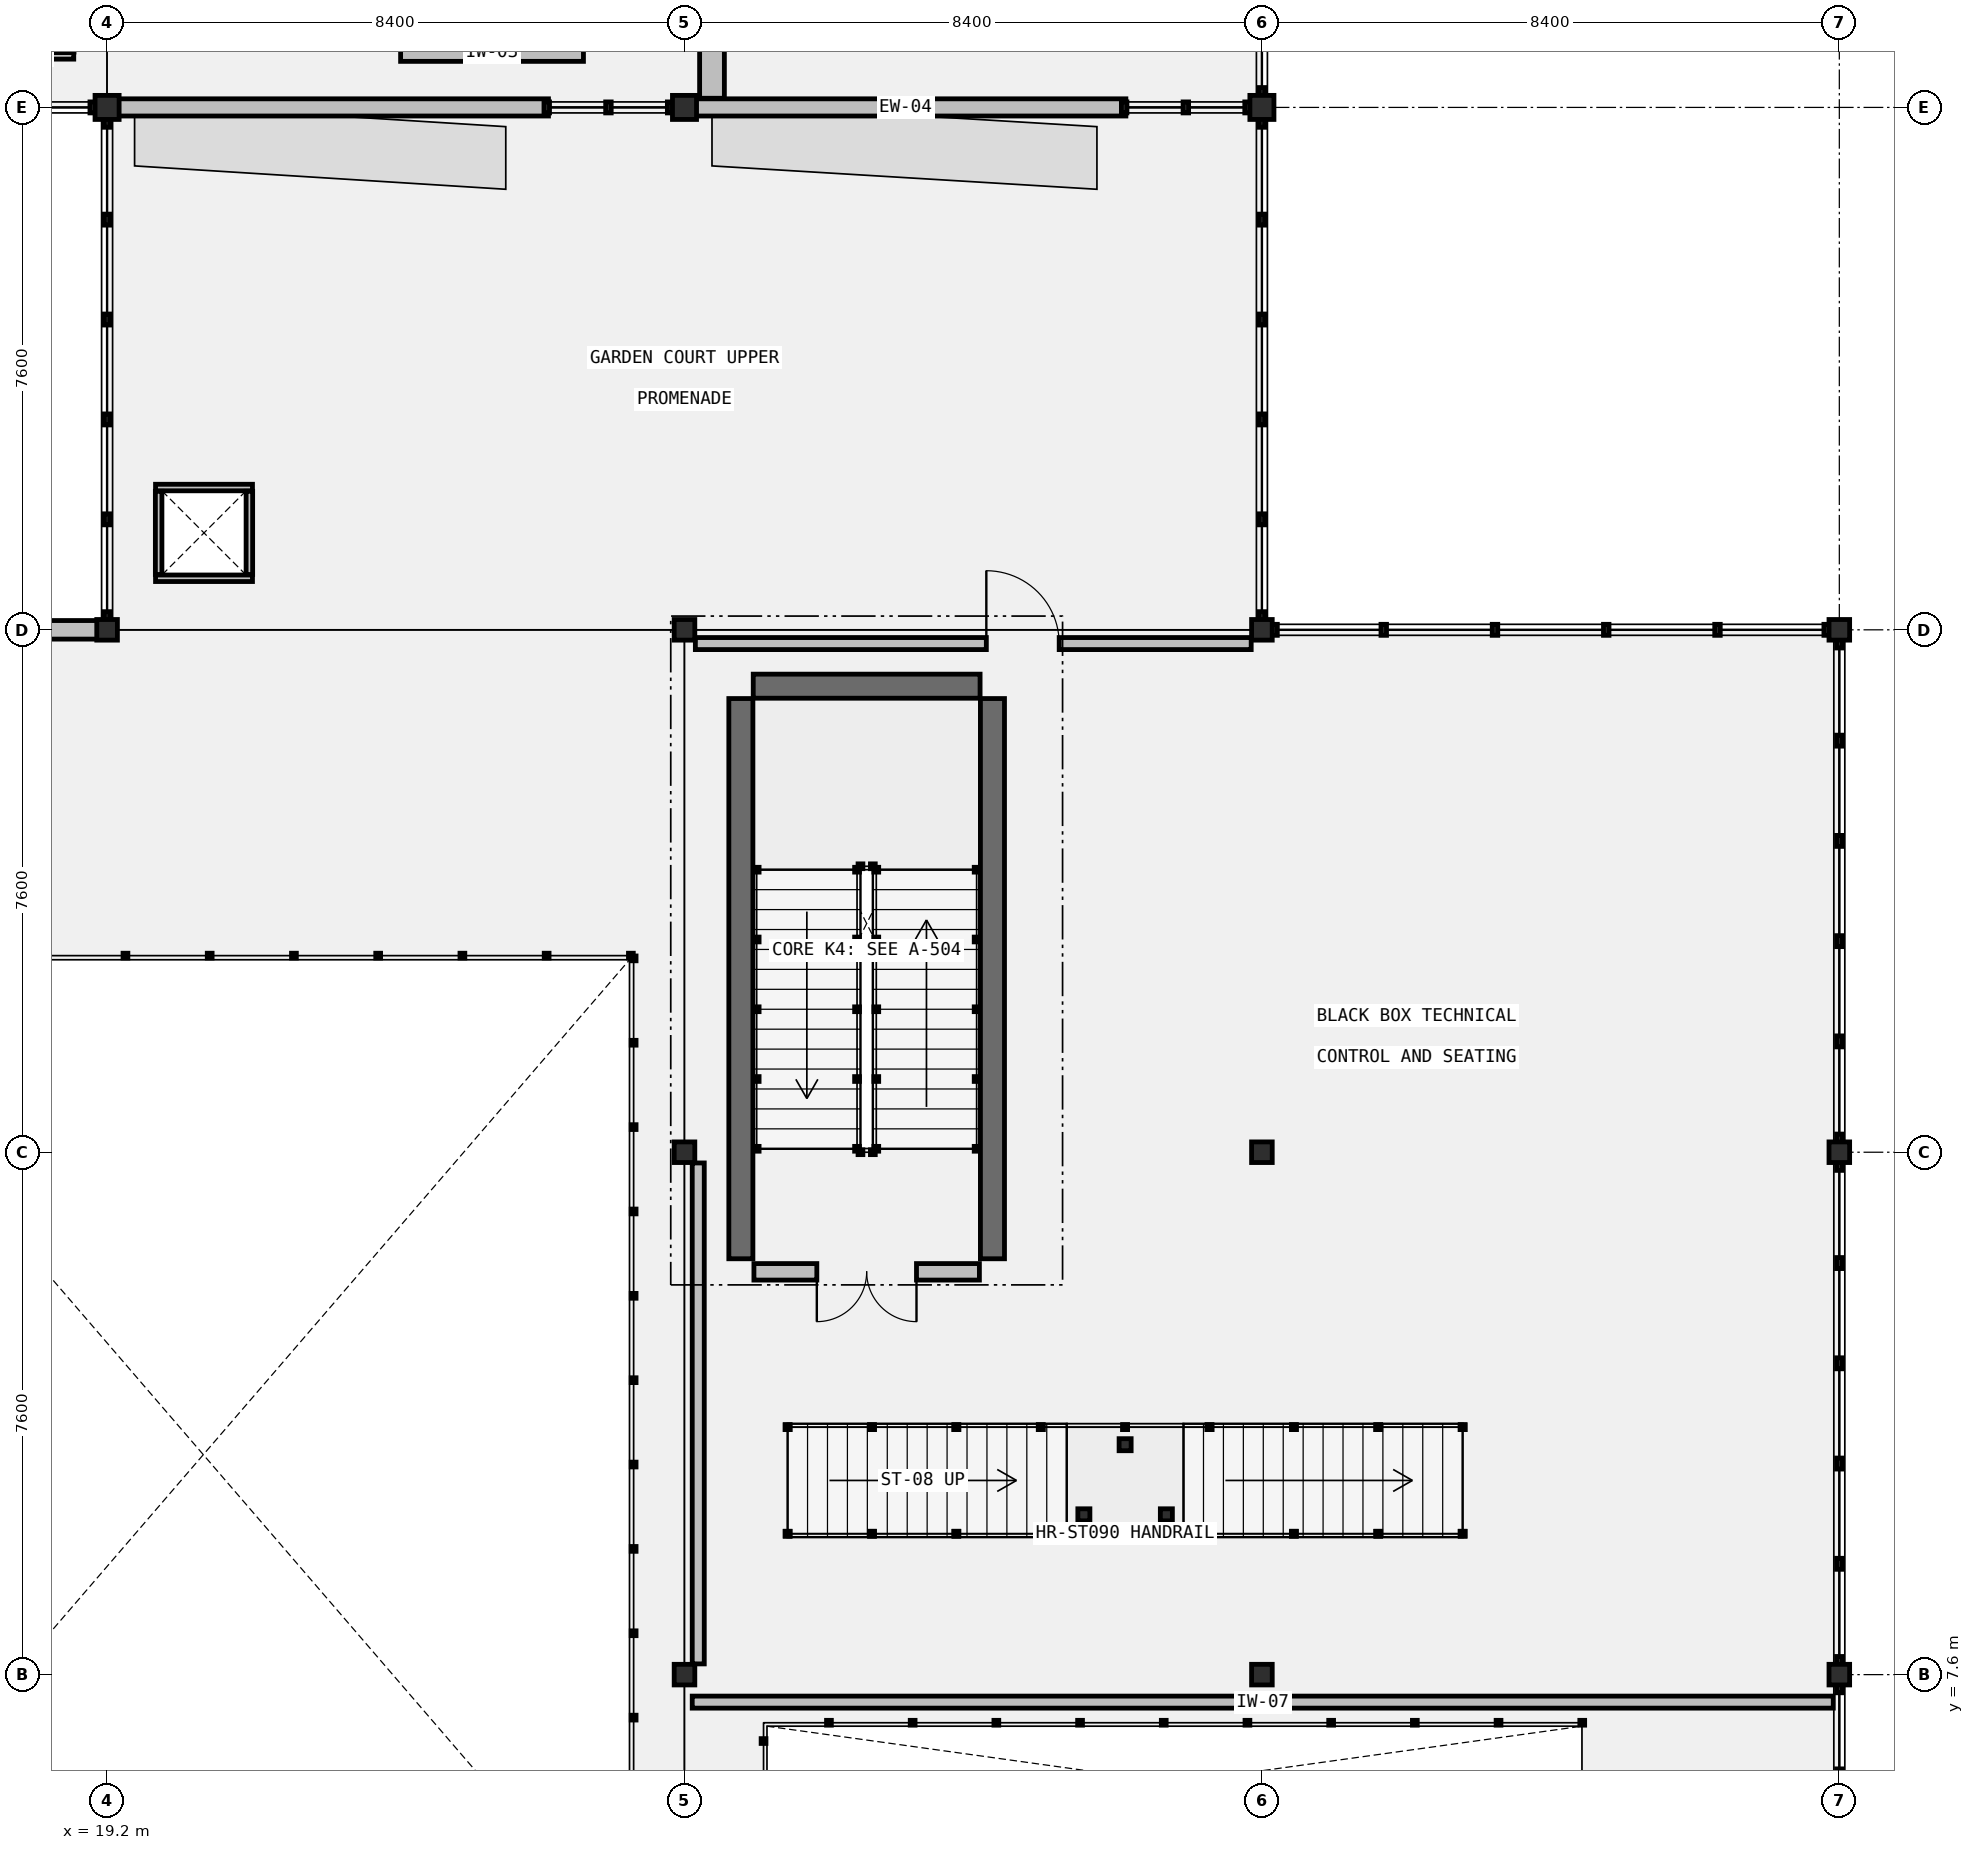
"""IFC4 building model, lengths in metres.
Left out: names, types, materials, properties, quantities, classifications, styles, units other than length and angle.
Written with IfcOpenShell. Run it as: python <this file> out.ifc"""

import sys

from ifc_helpers import new_model, si_unit, direction, frame, frame_2d, origin, origin_2d, place, context, subcontext, project, spatial, rectangle, i_section, extrude, element, fill, save


model = new_model("IFC4")
c1 = context("Model", 3, precision=1e-05, world=origin(), true_north=direction((0.0, 1.0)))
c2 = subcontext(c1, "Body", "Model", "MODEL_VIEW")
j1 = project(units=[si_unit("LENGTHUNIT", "METRE"), si_unit("PLANEANGLEUNIT", "RADIAN")], contexts=[c1])
p1 = place(None, origin())
s1 = spatial("IfcSite", under=j1, at=p1, CompositionType="ELEMENT")
p2 = place(p1, origin())
s2 = spatial("IfcBuilding", under=s1, at=p2, CompositionType="ELEMENT")
p3 = place(p2, frame((0.0, 0.0, 5.4)))
s3 = spatial("IfcBuildingStorey", under=s2, at=p3, CompositionType="ELEMENT", Elevation=5.4)
p4 = place(p3, frame((19.2, 22.8, 0.0), z_axis=(0.0, 0.0, 1.0), x_axis=(1.0, 0.0, 0.0)))
e1 = element("IfcColumn", 1, at=p4, inside=s3, PredefinedType="COLUMN", context=c2, shape_type="SweptSolid", body=[
    extrude(i_section(OverallWidth=0.3, OverallDepth=0.3, WebThickness=0.01, FlangeThickness=0.015, FilletRadius=0.018, at=origin_2d()), origin(), (0.0, 0.0, 1.0), 4.6),
])
p5 = place(p3, frame((19.2, 30.4, 0.0), z_axis=(0.0, 0.0, 1.0), x_axis=(1.0, 0.0, 0.0)))
e2 = element("IfcColumn", 2, at=p5, inside=s3, PredefinedType="COLUMN", context=c2, shape_type="SweptSolid", body=[
    extrude(i_section(OverallWidth=0.35, OverallDepth=0.35, WebThickness=0.012, FlangeThickness=0.019, FilletRadius=0.018, at=origin_2d()), origin(), (0.0, 0.0, 1.0), 4.6),
])
for number, where, z_axis, x_axis in (
    (3, (27.6, 7.6, 0.0), (0.0, 0.0, 1.0), (1.0, 0.0, 0.0)),
    (4, (27.6, 15.2, 0.0), (0.0, 0.0, 1.0), (1.0, 0.0, 0.0)),
    (5, (27.6, 22.8, 0.0), (0.0, 0.0, 1.0), (1.0, 0.0, 0.0)),
):
    element("IfcColumn", number, at=place(p3, frame(where, z_axis=z_axis, x_axis=x_axis)), inside=s3, PredefinedType="COLUMN", context=c2, shape_type="SweptSolid", body=[
        extrude(i_section(OverallWidth=0.3, OverallDepth=0.3, WebThickness=0.01, FlangeThickness=0.015, FilletRadius=0.018, at=origin_2d()), origin(), (0.0, 0.0, 1.0), 4.6),
    ])
p6 = place(p3, frame((27.6, 30.4, 0.0), z_axis=(0.0, 0.0, 1.0), x_axis=(1.0, 0.0, 0.0)))
e6 = element("IfcColumn", 6, at=p6, inside=s3, PredefinedType="COLUMN", context=c2, shape_type="SweptSolid", body=[
    extrude(i_section(OverallWidth=0.35, OverallDepth=0.35, WebThickness=0.012, FlangeThickness=0.019, FilletRadius=0.018, at=origin_2d()), origin(), (0.0, 0.0, 1.0), 4.6),
])
for number, where, z_axis, x_axis in (
    (7, (36.0, 7.6, 0.0), (0.0, 0.0, 1.0), (1.0, 0.0, 0.0)),
    (8, (36.0, 15.2, 0.0), (0.0, 0.0, 1.0), (1.0, 0.0, 0.0)),
    (9, (36.0, 22.8, 0.0), (0.0, 0.0, 1.0), (1.0, 0.0, 0.0)),
):
    element("IfcColumn", number, at=place(p3, frame(where, z_axis=z_axis, x_axis=x_axis)), inside=s3, PredefinedType="COLUMN", context=c2, shape_type="SweptSolid", body=[
        extrude(i_section(OverallWidth=0.3, OverallDepth=0.3, WebThickness=0.01, FlangeThickness=0.015, FilletRadius=0.018, at=origin_2d()), origin(), (0.0, 0.0, 1.0), 4.6),
    ])
p7 = place(p3, frame((36.0, 30.4, 0.0), z_axis=(0.0, 0.0, 1.0), x_axis=(1.0, 0.0, 0.0)))
e10 = element("IfcColumn", 10, at=p7, inside=s3, PredefinedType="COLUMN", context=c2, shape_type="SweptSolid", body=[
    extrude(i_section(OverallWidth=0.35, OverallDepth=0.35, WebThickness=0.012, FlangeThickness=0.019, FilletRadius=0.018, at=origin_2d()), origin(), (0.0, 0.0, 1.0), 4.6),
])
for number, where, z_axis, x_axis in (
    (11, (44.4, 7.6, 0.0), (0.0, 0.0, 1.0), (1.0, 0.0, 0.0)),
    (12, (44.4, 15.2, 0.0), (0.0, 0.0, 1.0), (1.0, 0.0, 0.0)),
    (13, (44.4, 22.8, 0.0), (0.0, 0.0, 1.0), (1.0, 0.0, 0.0)),
):
    element("IfcColumn", number, at=place(p3, frame(where, z_axis=z_axis, x_axis=x_axis)), inside=s3, PredefinedType="COLUMN", context=c2, shape_type="SweptSolid", body=[
        extrude(i_section(OverallWidth=0.3, OverallDepth=0.3, WebThickness=0.01, FlangeThickness=0.015, FilletRadius=0.018, at=origin_2d()), origin(), (0.0, 0.0, 1.0), 4.6),
    ])
p8 = place(p3, frame((32.08, 13.65, 0.0), z_axis=(0.0, 0.0, 1.0), x_axis=(0.0, 1.0, 0.0)))
e14 = element("IfcWall", 14, at=p8, inside=s3, PredefinedType="SHEAR", context=c2, shape_type="SweptSolid", body=[
    extrude(rectangle(XDim=8.15, YDim=0.35, at=frame_2d((4.075, 0.0))), origin(), (0.0, 0.0, 1.0), 4.36),
])
p9 = place(p3, frame((31.9, 21.98, 0.0), z_axis=(0.0, 0.0, 1.0), x_axis=(-1.0, 0.0, 0.0)))
e15 = element("IfcWall", 15, at=p9, inside=s3, PredefinedType="SHEAR", context=c2, shape_type="SweptSolid", body=[
    extrude(rectangle(XDim=3.3, YDim=0.35, at=frame_2d((1.65, 0.0))), origin(), (0.0, 0.0, 1.0), 4.36),
])
p10 = place(p3, frame((28.42, 21.8, 0.0), z_axis=(0.0, 0.0, 1.0), x_axis=(0.0, -1.0, 0.0)))
e16 = element("IfcWall", 16, at=p10, inside=s3, PredefinedType="SHEAR", context=c2, shape_type="SweptSolid", body=[
    extrude(rectangle(XDim=8.15, YDim=0.35, at=frame_2d((4.075, 0.0))), origin(), (0.0, 0.0, 1.0), 4.36),
])
p11 = place(p3, frame((19.21, 30.4, 0.0), z_axis=(0.0, 0.0, 1.0), x_axis=(1.0, 0.0, 0.0)))
e17 = element("IfcWall", 17, at=p11, inside=s3, PredefinedType="STANDARD", context=c2, shape_type="SweptSolid", body=[
    extrude(rectangle(XDim=6.411, YDim=0.25, at=frame_2d((3.206, 0.0))), origin(), (0.0, 0.0, 1.0), 3.338),
])
p12 = place(p3, frame((27.61, 30.4, 0.0), z_axis=(0.0, 0.0, 1.0), x_axis=(1.0, 0.0, 0.0)))
e18 = element("IfcWall", 18, at=p12, inside=s3, PredefinedType="STANDARD", context=c2, shape_type="SweptSolid", body=[
    extrude(rectangle(XDim=6.411, YDim=0.25, at=frame_2d((3.206, 0.0))), origin(), (0.0, 0.0, 1.0), 3.338),
])
p13 = place(p3, frame((12.81, 22.8, 0.0), z_axis=(0.0, 0.0, 1.0), x_axis=(1.0, 0.0, 0.0)))
e19 = element("IfcWall", 19, at=p13, inside=s3, PredefinedType="STANDARD", context=c2, shape_type="SweptSolid", body=[
    extrude(rectangle(XDim=6.38, YDim=0.27, at=frame_2d((3.19, 0.0))), origin(), (0.0, 0.0, 1.0), 3.756),
])
p14 = place(p13, frame((2.39, 0.0, 0.95)))
e20 = element("IfcOpeningElement", 20, at=p14, cuts=e19, PredefinedType="OPENING", context=c2, shape_type="SweptSolid", body=[
    extrude(rectangle(XDim=1.6, YDim=1.8, at=frame_2d((0.8, 0.9))), frame((0.0, 0.145, 0.0), z_axis=(0.0, -1.0, 0.0), x_axis=(1.0, 0.0, 0.0)), (0.0, 0.0, 1.0), 0.29),
])
p15 = place(p3, frame((17.305, 31.15, 0.0), z_axis=(0.0, 0.0, 1.0), x_axis=(1.0, 0.0, 0.0)))
e21 = element("IfcWall", 21, at=p15, inside=s3, PredefinedType="PARTITIONING", context=c2, shape_type="SweptSolid", body=[
    extrude(rectangle(XDim=1.41, YDim=0.095, at=frame_2d((0.705, 0.0))), origin(), (0.0, 0.0, 1.0), 4.36),
])
for number, where, z_axis, x_axis in (
    (22, (19.905, 23.55, 0.0), (0.0, 0.0, 1.0), (1.0, 0.0, 0.0)),
    (23, (19.905, 24.87, 0.0), (0.0, 0.0, 1.0), (1.0, 0.0, 0.0)),
):
    element("IfcWall", number, at=place(p3, frame(where, z_axis=z_axis, x_axis=x_axis)), inside=s3, PredefinedType="PARTITIONING", context=c2, shape_type="SweptSolid", body=[
        extrude(rectangle(XDim=1.41, YDim=0.095, at=frame_2d((0.705, 0.0))), origin(), (0.0, 0.0, 1.0), 3.788),
    ])
for number, where, z_axis, x_axis in (
    (24, (19.95, 23.605, 0.0), (0.0, 0.0, 1.0), (0.0, 1.0, 0.0)),
    (25, (21.27, 23.605, 0.0), (0.0, 0.0, 1.0), (0.0, 1.0, 0.0)),
):
    element("IfcWall", number, at=place(p3, frame(where, z_axis=z_axis, x_axis=x_axis)), inside=s3, PredefinedType="PARTITIONING", context=c2, shape_type="SweptSolid", body=[
        extrude(rectangle(XDim=1.21, YDim=0.095, at=frame_2d((0.605, 0.0))), origin(), (0.0, 0.0, 1.0), 4.36),
    ])
p16 = place(p3, frame((31.89, 13.46, 0.0), z_axis=(0.0, 0.0, 1.0), x_axis=(-1.0, 0.0, 0.0)))
e26 = element("IfcWall", 26, at=p16, inside=s3, PredefinedType="STANDARD", context=c2, shape_type="SweptSolid", body=[
    extrude(rectangle(XDim=3.28, YDim=0.24, at=frame_2d((1.64, 0.0))), origin(), (0.0, 0.0, 1.0), 4.36),
])
p17 = place(p16, frame((0.915, 0.0, 0.0)))
e27 = element("IfcOpeningElement", 27, at=p17, cuts=e26, PredefinedType="OPENING", context=c2, shape_type="SweptSolid", body=[
    extrude(rectangle(XDim=1.45, YDim=2.2, at=frame_2d((0.725, 1.1))), frame((0.0, 0.13, 0.0), z_axis=(0.0, -1.0, 0.0), x_axis=(1.0, 0.0, 0.0)), (0.0, 0.0, 1.0), 0.26),
])
for number, where, z_axis, x_axis in (
    (28, (33.41, 9.925, 0.0), (0.0, 0.0, 1.0), (1.0, 0.0, 0.0)),
    (29, (34.61, 9.925, 0.0), (0.0, 0.0, 1.0), (1.0, 0.0, 0.0)),
    (30, (34.01, 10.945, 0.0), (0.0, 0.0, 1.0), (1.0, 0.0, 0.0)),
):
    element("IfcColumn", number, at=place(p3, frame(where, z_axis=z_axis, x_axis=x_axis)), inside=s3, PredefinedType="COLUMN", context=c2, shape_type="SweptSolid", body=[
        extrude(i_section(OverallWidth=0.175, OverallDepth=0.175, WebThickness=0.008, FlangeThickness=0.011, FilletRadius=0.013, at=origin_2d()), origin(), (0.0, 0.0, 1.0), 2.13),
    ])
p18 = place(p3, frame((23.47, 31.2, 0.0), z_axis=(0.0, 0.0, 1.0), x_axis=(1.0, 0.0, 0.0)))
e31 = element("IfcWall", 31, at=p18, inside=s3, PredefinedType="STANDARD", context=c2, shape_type="SweptSolid", body=[
    extrude(rectangle(XDim=2.66, YDim=0.26, at=frame_2d((1.33, 0.0))), origin(), (0.0, 0.0, 1.0), 4.36),
])
p19 = place(p3, frame((28.0, 30.533, 0.0), z_axis=(0.0, 0.0, 1.0), x_axis=(0.0, 1.0, 0.0)))
e32 = element("IfcWall", 32, at=p19, inside=s3, PredefinedType="PARTITIONING", context=c2, shape_type="SweptSolid", body=[
    extrude(rectangle(XDim=17.081, YDim=0.36, at=frame_2d((8.541, 0.0))), origin(), (0.0, 0.0, 1.0), 3.75),
])
p20 = place(p3, frame((27.758, 22.6, 0.0), z_axis=(0.0, 0.0, 1.0), x_axis=(1.0, 0.0, 0.0)))
e33 = element("IfcWall", 33, at=p20, inside=s3, PredefinedType="PARTITIONING", context=c2, shape_type="SweptSolid", body=[
    extrude(rectangle(XDim=8.086, YDim=0.175, at=frame_2d((4.043, 0.0))), origin(), (0.0, 0.0, 1.0), 3.756),
])
p21 = place(p20, frame((4.233, 0.0, 0.0)))
e34 = element("IfcOpeningElement", 34, at=p21, cuts=e33, PredefinedType="OPENING", context=c2, shape_type="SweptSolid", body=[
    extrude(rectangle(XDim=1.06, YDim=2.15, at=frame_2d((0.53, 1.075))), frame((0.0, 0.097, 0.0), z_axis=(0.0, -1.0, 0.0), x_axis=(1.0, 0.0, 0.0)), (0.0, 0.0, 1.0), 0.195),
])
p22 = place(p3, frame((27.712, 7.2, 0.0), z_axis=(0.0, 0.0, 1.0), x_axis=(1.0, 0.0, 0.0)))
e35 = element("IfcWall", 35, at=p22, inside=s3, PredefinedType="PARTITIONING", context=c2, shape_type="SweptSolid", body=[
    extrude(rectangle(XDim=16.6, YDim=0.175, at=frame_2d((8.3, 0.0))), origin(), (0.0, 0.0, 1.0), 3.788),
])
p23 = place(p3, frame((27.8, 7.756, 0.0), z_axis=(0.0, 0.0, 1.0), x_axis=(0.0, 1.0, 0.0)))
e36 = element("IfcWall", 36, at=p23, inside=s3, PredefinedType="PARTITIONING", context=c2, shape_type="SweptSolid", body=[
    extrude(rectangle(XDim=7.288, YDim=0.175, at=frame_2d((3.644, 0.0))), origin(), (0.0, 0.0, 1.0), 3.756),
])
p24 = place(p17, origin())
e37 = element("IfcDoor", 37, at=p24, inside=s3, OperationType="DOUBLE_DOOR_SINGLE_SWING", PredefinedType="DOOR", context=c2, shape_type="SweptSolid", body=[
    extrude(rectangle(XDim=1.45, YDim=2.2, at=frame_2d((0.725, 1.1))), frame((0.0, 0.025, 0.0), z_axis=(0.0, -1.0, 0.0), x_axis=(1.0, 0.0, 0.0)), (0.0, 0.0, 1.0), 0.05),
])
fill(e27, e37)
p25 = place(p21, origin())
e38 = element("IfcDoor", 38, at=p25, inside=s3, OperationType="SINGLE_SWING_LEFT", PredefinedType="DOOR", context=c2, shape_type="SweptSolid", body=[
    extrude(rectangle(XDim=1.06, YDim=2.15, at=frame_2d((0.53, 1.075))), frame((0.0, 0.025, 0.0), z_axis=(0.0, -1.0, 0.0), x_axis=(1.0, 0.0, 0.0)), (0.0, 0.0, 1.0), 0.05),
])
fill(e34, e38)
save(model, sys.argv[1])
